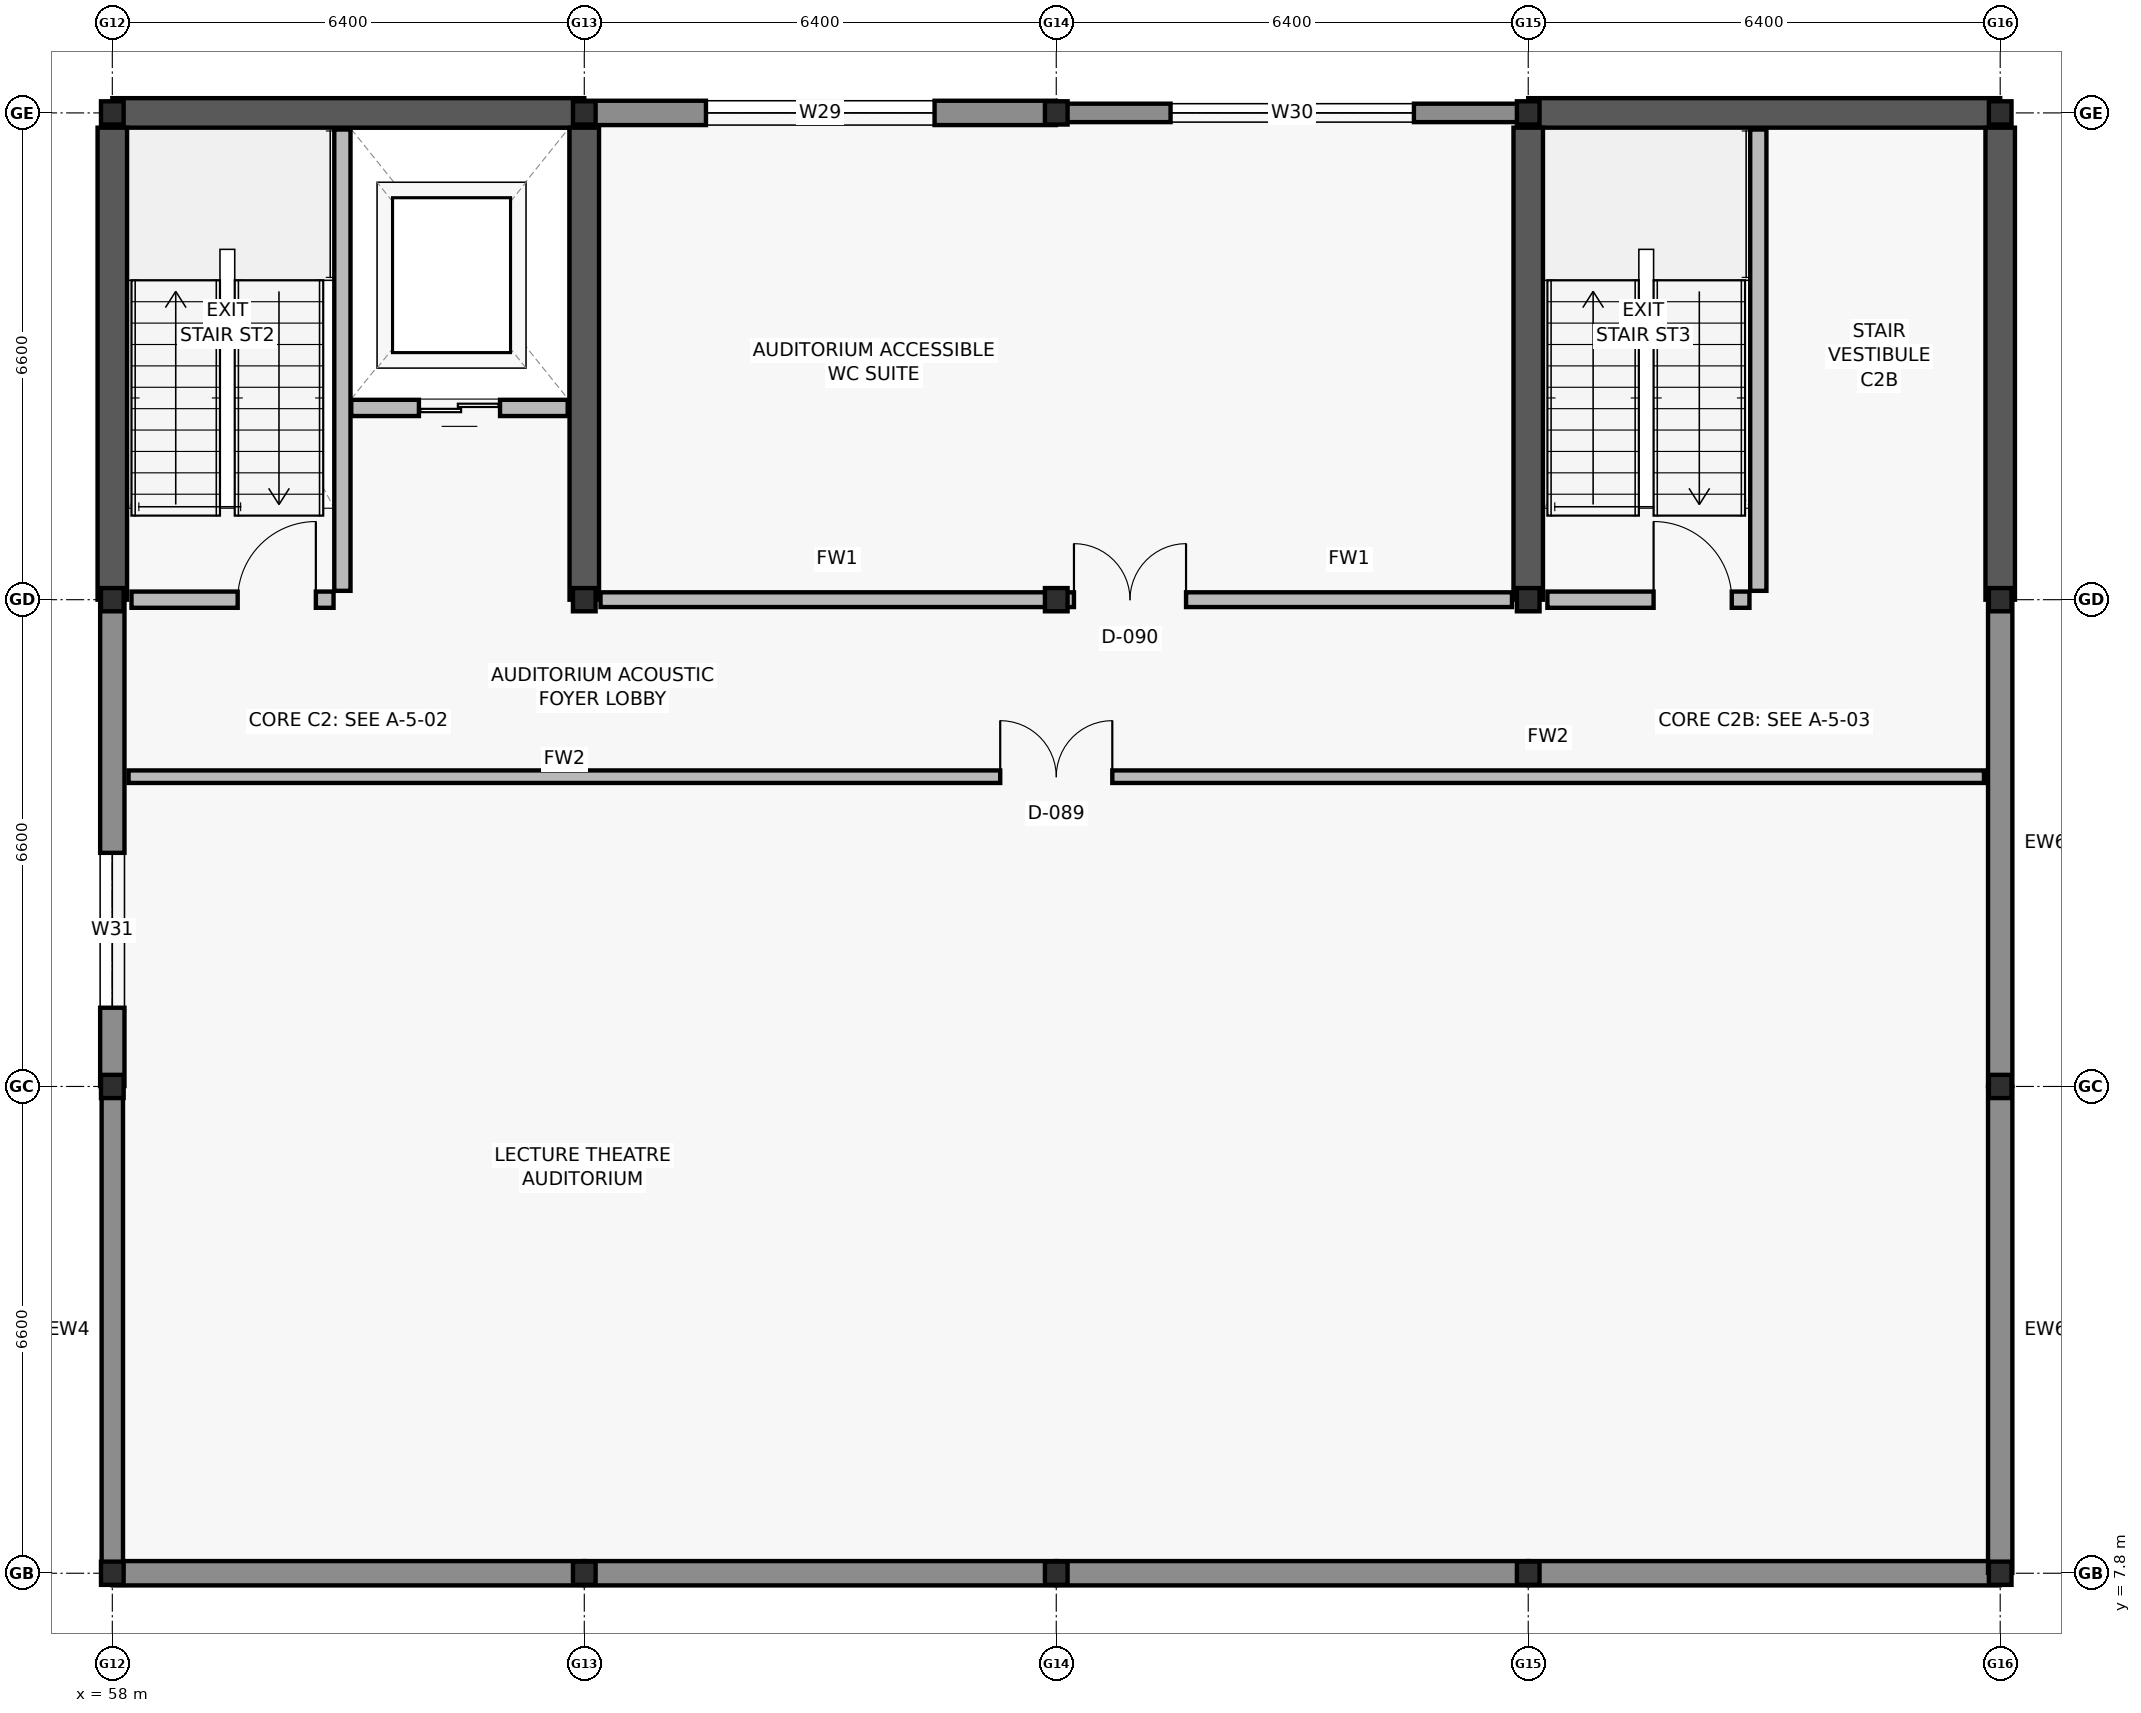
"""IFC4 building model, lengths in metres.
Left out: names, types, materials, properties, quantities, classifications, styles, units other than length and angle.
Written with IfcOpenShell. Run it as: python <this file> out.ifc"""

import sys

from ifc_helpers import new_model, si_unit, direction, frame, frame_2d, origin, origin_2d, place, context, subcontext, project, spatial, rectangle, i_section, extrude, element, fill, save


model = new_model("IFC4")
c1 = context("Model", 3, precision=1e-05, world=origin(), true_north=direction((0.0, 1.0)))
c2 = subcontext(c1, "Body", "Model", "MODEL_VIEW")
j1 = project(units=[si_unit("LENGTHUNIT", "METRE"), si_unit("PLANEANGLEUNIT", "RADIAN")], contexts=[c1])
p1 = place(None, origin())
s1 = spatial("IfcSite", under=j1, at=p1, CompositionType="ELEMENT")
p2 = place(p1, origin())
s2 = spatial("IfcBuilding", under=s1, at=p2, CompositionType="ELEMENT")
p3 = place(p2, frame((0.0, 0.0, 9.6)))
s3 = spatial("IfcBuildingStorey", under=s2, at=p3, CompositionType="ELEMENT", Elevation=9.6)
for number, where, z_axis, x_axis in (
    (1, (58.0, 7.8, 0.0), (0.0, 0.0, 1.0), (1.0, 0.0, 0.0)),
    (2, (58.0, 14.4, 0.0), (0.0, 0.0, 1.0), (1.0, 0.0, 0.0)),
    (3, (58.0, 21.0, 0.0), (0.0, 0.0, 1.0), (1.0, 0.0, 0.0)),
    (4, (58.0, 27.6, 0.0), (0.0, 0.0, 1.0), (1.0, 0.0, 0.0)),
    (5, (64.4, 7.8, 0.0), (0.0, 0.0, 1.0), (1.0, 0.0, 0.0)),
    (6, (64.4, 21.0, 0.0), (0.0, 0.0, 1.0), (1.0, 0.0, 0.0)),
    (7, (64.4, 27.6, 0.0), (0.0, 0.0, 1.0), (1.0, 0.0, 0.0)),
    (8, (70.8, 7.8, 0.0), (0.0, 0.0, 1.0), (1.0, 0.0, 0.0)),
    (9, (70.8, 21.0, 0.0), (0.0, 0.0, 1.0), (1.0, 0.0, 0.0)),
    (10, (70.8, 27.6, 0.0), (0.0, 0.0, 1.0), (1.0, 0.0, 0.0)),
    (11, (77.2, 7.8, 0.0), (0.0, 0.0, 1.0), (1.0, 0.0, 0.0)),
    (12, (77.2, 21.0, 0.0), (0.0, 0.0, 1.0), (1.0, 0.0, 0.0)),
    (13, (77.2, 27.6, 0.0), (0.0, 0.0, 1.0), (1.0, 0.0, 0.0)),
    (14, (83.6, 7.8, 0.0), (0.0, 0.0, 1.0), (1.0, 0.0, 0.0)),
    (15, (83.6, 14.4, 0.0), (0.0, 0.0, 1.0), (1.0, 0.0, 0.0)),
    (16, (83.6, 21.0, 0.0), (0.0, 0.0, 1.0), (1.0, 0.0, 0.0)),
    (17, (83.6, 27.6, 0.0), (0.0, 0.0, 1.0), (1.0, 0.0, 0.0)),
):
    element("IfcColumn", number, at=place(p3, frame(where, z_axis=z_axis, x_axis=x_axis)), inside=s3, PredefinedType="COLUMN", context=c2, shape_type="SweptSolid", body=[
        extrude(i_section(OverallWidth=0.307, OverallDepth=0.315, WebThickness=0.012, FlangeThickness=0.019, FilletRadius=0.017, at=origin_2d()), origin(), (0.0, 0.0, 1.0), 3.9),
    ])
for number, where, z_axis, x_axis in (
    (18, (58.0, 27.6, 0.0), (0.0, 0.0, 1.0), (1.0, 0.0, 0.0)),
    (19, (58.0, 21.0, 0.0), (0.0, 0.0, 1.0), (0.0, 1.0, 0.0)),
    (20, (64.4, 21.0, 0.0), (0.0, 0.0, 1.0), (0.0, 1.0, 0.0)),
):
    element("IfcWall", number, at=place(p3, frame(where, z_axis=z_axis, x_axis=x_axis)), inside=s3, PredefinedType="SHEAR", context=c2, shape_type="SweptSolid", body=[
        extrude(rectangle(XDim=6.4, YDim=0.4, at=frame_2d((3.2, 0.0))), origin(), (0.0, 0.0, 1.0), 3.66),
    ])
p4 = place(p3, frame((77.2, 27.6, 0.0), z_axis=(0.0, 0.0, 1.0), x_axis=(1.0, 0.0, 0.0)))
e21 = element("IfcWall", 21, at=p4, inside=s3, PredefinedType="SHEAR", context=c2, shape_type="SweptSolid", body=[
    extrude(rectangle(XDim=6.4, YDim=0.4, at=frame_2d((3.2, 0.0))), origin(), (0.0, 0.0, 1.0), 3.66),
])
for number, where, z_axis, x_axis in (
    (22, (77.2, 21.0, 0.0), (0.0, 0.0, 1.0), (0.0, 1.0, 0.0)),
    (23, (83.6, 21.0, 0.0), (0.0, 0.0, 1.0), (0.0, 1.0, 0.0)),
):
    element("IfcWall", number, at=place(p3, frame(where, z_axis=z_axis, x_axis=x_axis)), inside=s3, PredefinedType="SHEAR", context=c2, shape_type="SweptSolid", body=[
        extrude(rectangle(XDim=6.4, YDim=0.4, at=frame_2d((3.2, 0.0))), origin(), (0.0, 0.0, 1.0), 3.66),
    ])
p5 = place(p3, frame((64.395, 7.8, 0.0), z_axis=(0.0, 0.0, 1.0), x_axis=(-1.0, 0.0, 0.0)))
e24 = element("IfcWall", 24, at=p5, inside=s3, PredefinedType="SOLIDWALL", context=c2, shape_type="SweptSolid", body=[
    extrude(rectangle(XDim=6.39, YDim=0.33, at=frame_2d((3.195, 0.0))), origin(), (0.0, 0.0, 1.0), 3.02),
])
p6 = place(p3, frame((70.795, 7.8, 0.0), z_axis=(0.0, 0.0, 1.0), x_axis=(-1.0, 0.0, 0.0)))
e25 = element("IfcWall", 25, at=p6, inside=s3, PredefinedType="SOLIDWALL", context=c2, shape_type="SweptSolid", body=[
    extrude(rectangle(XDim=6.39, YDim=0.33, at=frame_2d((3.195, 0.0))), origin(), (0.0, 0.0, 1.0), 3.02),
])
p7 = place(p3, frame((64.405, 27.6, 0.0), z_axis=(0.0, 0.0, 1.0), x_axis=(1.0, 0.0, 0.0)))
e26 = element("IfcWall", 26, at=p7, inside=s3, PredefinedType="SOLIDWALL", context=c2, shape_type="SweptSolid", body=[
    extrude(rectangle(XDim=6.39, YDim=0.33, at=frame_2d((3.195, 0.0))), origin(), (0.0, 0.0, 1.0), 3.02),
])
p8 = place(p7, frame((1.645, 0.0, 0.8)))
e27 = element("IfcOpeningElement", 27, at=p8, cuts=e26, PredefinedType="OPENING", context=c2, shape_type="SweptSolid", body=[
    extrude(rectangle(XDim=3.1, YDim=1.15, at=frame_2d((1.55, 0.575))), frame((0.0, 0.175, 0.0), z_axis=(0.0, -1.0, 0.0), x_axis=(1.0, 0.0, 0.0)), (0.0, 0.0, 1.0), 0.35),
])
p9 = place(p3, frame((77.195, 7.8, 0.0), z_axis=(0.0, 0.0, 1.0), x_axis=(-1.0, 0.0, 0.0)))
e28 = element("IfcWall", 28, at=p9, inside=s3, PredefinedType="SOLIDWALL", context=c2, shape_type="SweptSolid", body=[
    extrude(rectangle(XDim=6.39, YDim=0.33, at=frame_2d((3.195, 0.0))), origin(), (0.0, 0.0, 1.0), 3.02),
])
p10 = place(p3, frame((70.805, 27.6, 0.0), z_axis=(0.0, 0.0, 1.0), x_axis=(1.0, 0.0, 0.0)))
e29 = element("IfcWall", 29, at=p10, inside=s3, PredefinedType="SOLIDWALL", context=c2, shape_type="SweptSolid", body=[
    extrude(rectangle(XDim=6.39, YDim=0.25, at=frame_2d((3.195, 0.0))), origin(), (0.0, 0.0, 1.0), 3.02),
])
p11 = place(p10, frame((1.545, 0.0, 0.8)))
e30 = element("IfcOpeningElement", 30, at=p11, cuts=e29, PredefinedType="OPENING", context=c2, shape_type="SweptSolid", body=[
    extrude(rectangle(XDim=3.3, YDim=1.25, at=frame_2d((1.65, 0.625))), frame((0.0, 0.135, 0.0), z_axis=(0.0, -1.0, 0.0), x_axis=(1.0, 0.0, 0.0)), (0.0, 0.0, 1.0), 0.27),
])
p12 = place(p3, frame((83.595, 7.8, 0.0), z_axis=(0.0, 0.0, 1.0), x_axis=(-1.0, 0.0, 0.0)))
e31 = element("IfcWall", 31, at=p12, inside=s3, PredefinedType="SOLIDWALL", context=c2, shape_type="SweptSolid", body=[
    extrude(rectangle(XDim=6.39, YDim=0.33, at=frame_2d((3.195, 0.0))), origin(), (0.0, 0.0, 1.0), 3.02),
])
p13 = place(p3, frame((58.0, 7.805, 0.0), z_axis=(0.0, 0.0, 1.0), x_axis=(0.0, 1.0, 0.0)))
e32 = element("IfcWall", 32, at=p13, inside=s3, PredefinedType="SOLIDWALL", context=c2, shape_type="SweptSolid", body=[
    extrude(rectangle(XDim=6.59, YDim=0.29, at=frame_2d((3.295, 0.0))), origin(), (0.0, 0.0, 1.0), 3.02),
])
p14 = place(p3, frame((83.6, 14.395, 0.0), z_axis=(0.0, 0.0, 1.0), x_axis=(0.0, -1.0, 0.0)))
e33 = element("IfcWall", 33, at=p14, inside=s3, PredefinedType="SOLIDWALL", context=c2, shape_type="SweptSolid", body=[
    extrude(rectangle(XDim=6.59, YDim=0.33, at=frame_2d((3.295, 0.0))), origin(), (0.0, 0.0, 1.0), 3.02),
])
p15 = place(p3, frame((58.0, 14.405, 0.0), z_axis=(0.0, 0.0, 1.0), x_axis=(0.0, 1.0, 0.0)))
e34 = element("IfcWall", 34, at=p15, inside=s3, PredefinedType="SOLIDWALL", context=c2, shape_type="SweptSolid", body=[
    extrude(rectangle(XDim=6.59, YDim=0.33, at=frame_2d((3.295, 0.0))), origin(), (0.0, 0.0, 1.0), 3.02),
])
p16 = place(p15, frame((1.062, 0.0, 0.8)))
e35 = element("IfcOpeningElement", 35, at=p16, cuts=e34, PredefinedType="OPENING", context=c2, shape_type="SweptSolid", body=[
    extrude(rectangle(XDim=2.1, YDim=1.25, at=frame_2d((1.05, 0.625))), frame((0.0, 0.175, 0.0), z_axis=(0.0, -1.0, 0.0), x_axis=(1.0, 0.0, 0.0)), (0.0, 0.0, 1.0), 0.35),
])
p17 = place(p3, frame((83.6, 20.995, 0.0), z_axis=(0.0, 0.0, 1.0), x_axis=(0.0, -1.0, 0.0)))
e36 = element("IfcWall", 36, at=p17, inside=s3, PredefinedType="SOLIDWALL", context=c2, shape_type="SweptSolid", body=[
    extrude(rectangle(XDim=6.59, YDim=0.33, at=frame_2d((3.295, 0.0))), origin(), (0.0, 0.0, 1.0), 3.02),
])
p18 = place(p3, frame((61.12, 21.12, 0.0), z_axis=(0.0, 0.0, 1.0), x_axis=(0.0, 1.0, 0.0)))
e37 = element("IfcWall", 37, at=p18, inside=s3, PredefinedType="SOLIDWALL", context=c2, shape_type="SweptSolid", body=[
    extrude(rectangle(XDim=6.255, YDim=0.22, at=frame_2d((3.127, 0.0))), origin(), (0.0, 0.0, 1.0), 3.66),
])
p19 = place(p3, frame((58.26, 21.0, 0.0), z_axis=(0.0, 0.0, 1.0), x_axis=(1.0, 0.0, 0.0)))
e38 = element("IfcWall", 38, at=p19, inside=s3, PredefinedType="SOLIDWALL", context=c2, shape_type="SweptSolid", body=[
    extrude(rectangle(XDim=2.74, YDim=0.22, at=frame_2d((1.37, 0.0))), origin(), (0.0, 0.0, 1.0), 3.02),
])
p20 = place(p19, frame((1.44, 0.0, 0.0)))
e39 = element("IfcOpeningElement", 39, at=p20, cuts=e38, PredefinedType="OPENING", context=c2, shape_type="SweptSolid", body=[
    extrude(rectangle(XDim=1.06, YDim=2.1, at=frame_2d((0.53, 1.05))), frame((0.0, 0.12, 0.0), z_axis=(0.0, -1.0, 0.0), x_axis=(1.0, 0.0, 0.0)), (0.0, 0.0, 1.0), 0.24),
])
p21 = place(p3, frame((61.24, 23.6, 0.0), z_axis=(0.0, 0.0, 1.0), x_axis=(1.0, 0.0, 0.0)))
e40 = element("IfcWall", 40, at=p21, inside=s3, PredefinedType="SOLIDWALL", context=c2, shape_type="SweptSolid", body=[
    extrude(rectangle(XDim=2.935, YDim=0.22, at=frame_2d((1.468, 0.0))), origin(), (0.0, 0.0, 1.0), 3.66),
])
p22 = place(p21, frame((0.917, 0.0, 0.0)))
e41 = element("IfcOpeningElement", 41, at=p22, cuts=e40, PredefinedType="OPENING", context=c2, shape_type="SweptSolid", body=[
    extrude(rectangle(XDim=1.1, YDim=2.1, at=frame_2d((0.55, 1.05))), frame((0.0, 0.12, 0.0), z_axis=(0.0, -1.0, 0.0), x_axis=(1.0, 0.0, 0.0)), (0.0, 0.0, 1.0), 0.24),
])
p23 = place(p3, frame((80.32, 21.12, 0.0), z_axis=(0.0, 0.0, 1.0), x_axis=(0.0, 1.0, 0.0)))
e42 = element("IfcWall", 42, at=p23, inside=s3, PredefinedType="SOLIDWALL", context=c2, shape_type="SweptSolid", body=[
    extrude(rectangle(XDim=6.255, YDim=0.22, at=frame_2d((3.127, 0.0))), origin(), (0.0, 0.0, 1.0), 3.66),
])
p24 = place(p3, frame((77.46, 21.0, 0.0), z_axis=(0.0, 0.0, 1.0), x_axis=(1.0, 0.0, 0.0)))
e43 = element("IfcWall", 43, at=p24, inside=s3, PredefinedType="SOLIDWALL", context=c2, shape_type="SweptSolid", body=[
    extrude(rectangle(XDim=2.74, YDim=0.22, at=frame_2d((1.37, 0.0))), origin(), (0.0, 0.0, 1.0), 3.02),
])
p25 = place(p24, frame((1.44, 0.0, 0.0)))
e44 = element("IfcOpeningElement", 44, at=p25, cuts=e43, PredefinedType="OPENING", context=c2, shape_type="SweptSolid", body=[
    extrude(rectangle(XDim=1.06, YDim=2.1, at=frame_2d((0.53, 1.05))), frame((0.0, 0.12, 0.0), z_axis=(0.0, -1.0, 0.0), x_axis=(1.0, 0.0, 0.0)), (0.0, 0.0, 1.0), 0.24),
])
p26 = place(p3, frame((58.22, 18.6, 0.0), z_axis=(0.0, 0.0, 1.0), x_axis=(1.0, 0.0, 0.0)))
e45 = element("IfcWall", 45, at=p26, inside=s3, PredefinedType="PARTITIONING", context=c2, shape_type="SweptSolid", body=[
    extrude(rectangle(XDim=25.16, YDim=0.17, at=frame_2d((12.58, 0.0))), origin(), (0.0, 0.0, 1.0), 3.0),
])
p27 = place(p26, frame((11.82, 0.0, 0.0)))
e46 = element("IfcOpeningElement", 46, at=p27, cuts=e45, PredefinedType="OPENING", context=c2, shape_type="SweptSolid", body=[
    extrude(rectangle(XDim=1.52, YDim=2.15, at=frame_2d((0.76, 1.075))), frame((0.0, 0.095, 0.0), z_axis=(0.0, -1.0, 0.0), x_axis=(1.0, 0.0, 0.0)), (0.0, 0.0, 1.0), 0.19),
])
p28 = place(p3, frame((64.62, 21.0, 0.0), z_axis=(0.0, 0.0, 1.0), x_axis=(1.0, 0.0, 0.0)))
e47 = element("IfcWall", 47, at=p28, inside=s3, PredefinedType="PARTITIONING", context=c2, shape_type="SweptSolid", body=[
    extrude(rectangle(XDim=12.36, YDim=0.2, at=frame_2d((6.18, 0.0))), origin(), (0.0, 0.0, 1.0), 3.0),
])
p29 = place(p28, frame((6.42, 0.0, 0.0)))
e48 = element("IfcOpeningElement", 48, at=p29, cuts=e47, PredefinedType="OPENING", context=c2, shape_type="SweptSolid", body=[
    extrude(rectangle(XDim=1.52, YDim=2.15, at=frame_2d((0.76, 1.075))), frame((0.0, 0.11, 0.0), z_axis=(0.0, -1.0, 0.0), x_axis=(1.0, 0.0, 0.0)), (0.0, 0.0, 1.0), 0.22),
])
p30 = place(p8, origin())
e49 = element("IfcWindow", 49, at=p30, inside=s3, PartitioningType="TRIPLE_PANEL_VERTICAL", PredefinedType="WINDOW", context=c2, shape_type="SweptSolid", body=[
    extrude(rectangle(XDim=3.1, YDim=1.15, at=frame_2d((1.55, 0.575))), frame((0.0, 0.03, 0.0), z_axis=(0.0, -1.0, 0.0), x_axis=(1.0, 0.0, 0.0)), (0.0, 0.0, 1.0), 0.06),
])
fill(e27, e49)
p31 = place(p11, origin())
e50 = element("IfcWindow", 50, at=p31, inside=s3, PartitioningType="TRIPLE_PANEL_VERTICAL", PredefinedType="WINDOW", context=c2, shape_type="SweptSolid", body=[
    extrude(rectangle(XDim=3.3, YDim=1.25, at=frame_2d((1.65, 0.625))), frame((0.0, 0.03, 0.0), z_axis=(0.0, -1.0, 0.0), x_axis=(1.0, 0.0, 0.0)), (0.0, 0.0, 1.0), 0.06),
])
fill(e30, e50)
p32 = place(p16, origin())
e51 = element("IfcWindow", 51, at=p32, inside=s3, PartitioningType="DOUBLE_PANEL_VERTICAL", PredefinedType="WINDOW", context=c2, shape_type="SweptSolid", body=[
    extrude(rectangle(XDim=2.1, YDim=1.25, at=frame_2d((1.05, 0.625))), frame((0.0, 0.03, 0.0), z_axis=(0.0, -1.0, 0.0), x_axis=(1.0, 0.0, 0.0)), (0.0, 0.0, 1.0), 0.06),
])
fill(e35, e51)
p33 = place(p20, origin())
e52 = element("IfcDoor", 52, at=p33, inside=s3, OperationType="SINGLE_SWING_RIGHT", PredefinedType="DOOR", context=c2, shape_type="SweptSolid", body=[
    extrude(rectangle(XDim=1.06, YDim=2.1, at=frame_2d((0.53, 1.05))), frame((0.0, 0.025, 0.0), z_axis=(0.0, -1.0, 0.0), x_axis=(1.0, 0.0, 0.0)), (0.0, 0.0, 1.0), 0.05),
])
fill(e39, e52)
p34 = place(p22, origin())
e53 = element("IfcDoor", 53, at=p34, inside=s3, OperationType="DOUBLE_DOOR_SLIDING", PredefinedType="DOOR", context=c2, shape_type="SweptSolid", body=[
    extrude(rectangle(XDim=1.1, YDim=2.1, at=frame_2d((0.55, 1.05))), frame((0.0, 0.025, 0.0), z_axis=(0.0, -1.0, 0.0), x_axis=(1.0, 0.0, 0.0)), (0.0, 0.0, 1.0), 0.05),
])
fill(e41, e53)
p35 = place(p25, origin())
e54 = element("IfcDoor", 54, at=p35, inside=s3, OperationType="SINGLE_SWING_LEFT", PredefinedType="DOOR", context=c2, shape_type="SweptSolid", body=[
    extrude(rectangle(XDim=1.06, YDim=2.1, at=frame_2d((0.53, 1.05))), frame((0.0, 0.025, 0.0), z_axis=(0.0, -1.0, 0.0), x_axis=(1.0, 0.0, 0.0)), (0.0, 0.0, 1.0), 0.05),
])
fill(e44, e54)
p36 = place(p27, origin())
e55 = element("IfcDoor", 55, at=p36, inside=s3, OperationType="DOUBLE_DOOR_SINGLE_SWING", PredefinedType="DOOR", context=c2, shape_type="SweptSolid", body=[
    extrude(rectangle(XDim=1.52, YDim=2.15, at=frame_2d((0.76, 1.075))), frame((0.0, 0.025, 0.0), z_axis=(0.0, -1.0, 0.0), x_axis=(1.0, 0.0, 0.0)), (0.0, 0.0, 1.0), 0.05),
])
fill(e46, e55)
p37 = place(p29, origin())
e56 = element("IfcDoor", 56, at=p37, inside=s3, OperationType="DOUBLE_DOOR_SINGLE_SWING", PredefinedType="DOOR", context=c2, shape_type="SweptSolid", body=[
    extrude(rectangle(XDim=1.52, YDim=2.15, at=frame_2d((0.76, 1.075))), frame((0.0, 0.025, 0.0), z_axis=(0.0, -1.0, 0.0), x_axis=(1.0, 0.0, 0.0)), (0.0, 0.0, 1.0), 0.05),
])
fill(e48, e56)
save(model, sys.argv[1])
